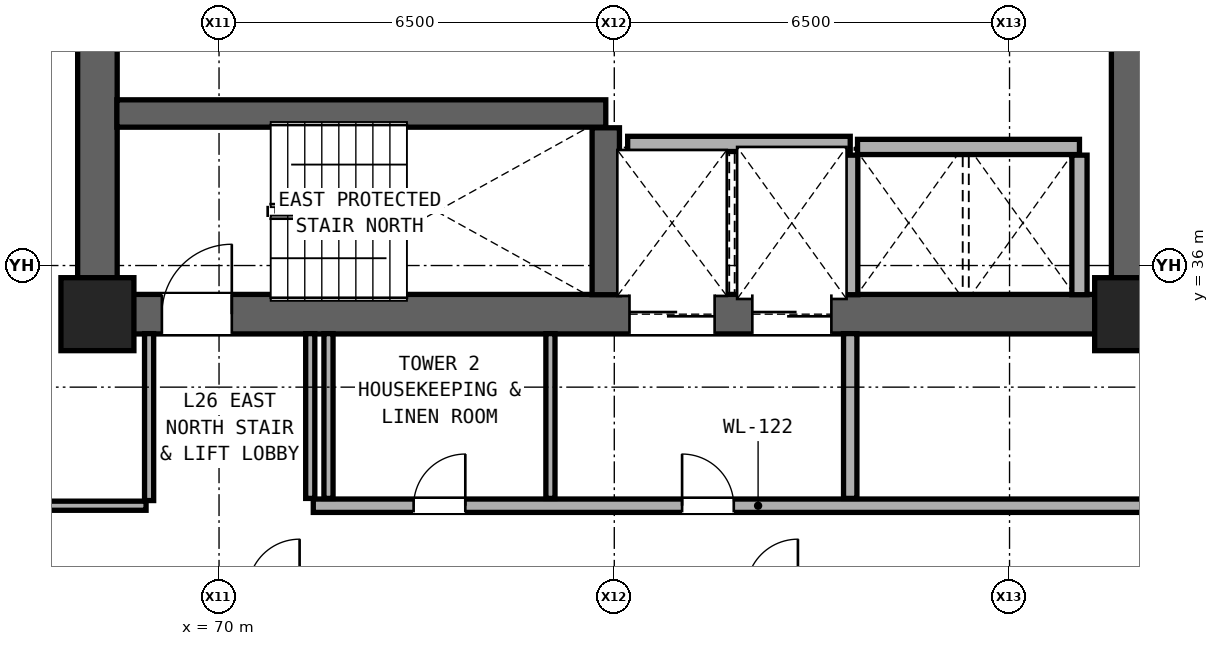
"""IFC4 building model, lengths in metres.
Left out: names, types, materials, properties, quantities, classifications, styles, units other than length and angle.
Written with IfcOpenShell. Run it as: python <this file> out.ifc"""

import sys

from ifc_helpers import new_model, si_unit, direction, frame, frame_2d, origin, origin_2d, place, context, subcontext, project, spatial, rectangle, extrude, element, fill, save


model = new_model("IFC4")
c1 = context("Model", 3, precision=1e-05, world=origin(), true_north=direction((0.0, 1.0)))
c2 = subcontext(c1, "Body", "Model", "MODEL_VIEW")
j1 = project(units=[si_unit("LENGTHUNIT", "METRE"), si_unit("PLANEANGLEUNIT", "RADIAN")], contexts=[c1])
p1 = place(None, origin())
s1 = spatial("IfcSite", under=j1, at=p1, CompositionType="ELEMENT")
p2 = place(p1, origin())
s2 = spatial("IfcBuilding", under=s1, at=p2, CompositionType="ELEMENT")
p3 = place(p2, frame((0.0, 0.0, 95.0)))
s3 = spatial("IfcBuildingStorey", under=s2, at=p3, CompositionType="ELEMENT", Elevation=95.0)
for number, where, z_axis, x_axis in (
    (1, (68.0, 35.2, 0.0), (0.0, 0.0, 1.0), (1.0, 0.0, 0.0)),
    (2, (85.0, 35.2, 0.0), (0.0, 0.0, 1.0), (1.0, 0.0, 0.0)),
):
    element("IfcColumn", number, at=place(p3, frame(where, z_axis=z_axis, x_axis=x_axis)), inside=s3, PredefinedType="COLUMN", context=c2, shape_type="SweptSolid", body=[
        extrude(rectangle(XDim=1.2, YDim=1.2, at=origin_2d()), origin(), (0.0, 0.0, 1.0), 3.3),
    ])
for number, where, z_axis, x_axis in (
    (3, (68.0, 35.2, 0.0), (0.0, 0.0, 1.0), (0.0, 1.0, 0.0)),
    (4, (85.0, 35.2, 0.0), (0.0, 0.0, 1.0), (0.0, 1.0, 0.0)),
):
    element("IfcWall", number, at=place(p3, frame(where, z_axis=z_axis, x_axis=x_axis)), inside=s3, PredefinedType="SHEAR", context=c2, shape_type="SweptSolid", body=[
        extrude(rectangle(XDim=5.6, YDim=0.65, at=frame_2d((2.8, 0.0))), origin(), (0.0, 0.0, 1.0), 3.08),
    ])
p4 = place(p3, frame((68.0, 35.2, 0.0), z_axis=(0.0, 0.0, 1.0), x_axis=(1.0, 0.0, 0.0)))
e5 = element("IfcWall", 5, at=p4, inside=s3, PredefinedType="SHEAR", context=c2, shape_type="SweptSolid", body=[
    extrude(rectangle(XDim=17.0, YDim=0.65, at=frame_2d((8.5, 0.0))), origin(), (0.0, 0.0, 1.0), 3.08),
])
p5 = place(p4, frame((1.06, 0.0, 0.0)))
e6 = element("IfcOpeningElement", 6, at=p5, cuts=e5, PredefinedType="OPENING", context=c2, shape_type="SweptSolid", body=[
    extrude(rectangle(XDim=1.15, YDim=2.2, at=frame_2d((0.575, 1.1))), frame((0.0, 0.335, 0.0), z_axis=(0.0, -1.0, 0.0), x_axis=(1.0, 0.0, 0.0)), (0.0, 0.0, 1.0), 0.67),
])
p6 = place(p4, frame((8.75, 0.0, 0.0)))
e7 = element("IfcOpeningElement", 7, at=p6, cuts=e5, PredefinedType="OPENING", context=c2, shape_type="SweptSolid", body=[
    extrude(rectangle(XDim=1.4, YDim=2.35, at=frame_2d((0.7, 1.175))), frame((0.0, 0.335, 0.0), z_axis=(0.0, -1.0, 0.0), x_axis=(1.0, 0.0, 0.0)), (0.0, 0.0, 1.0), 0.67),
])
p7 = place(p4, frame((10.77, 0.0, 0.0)))
e8 = element("IfcOpeningElement", 8, at=p7, cuts=e5, PredefinedType="OPENING", context=c2, shape_type="SweptSolid", body=[
    extrude(rectangle(XDim=1.3, YDim=2.3, at=frame_2d((0.65, 1.15))), frame((0.0, 0.335, 0.0), z_axis=(0.0, -1.0, 0.0), x_axis=(1.0, 0.0, 0.0)), (0.0, 0.0, 1.0), 0.67),
])
p8 = place(p3, frame((66.68, 32.05, 0.0), z_axis=(0.0, 0.0, 1.0), x_axis=(1.0, 0.0, 0.0)))
e9 = element("IfcWall", 9, at=p8, inside=s3, PredefinedType="PARTITIONING", context=c2, shape_type="SweptSolid", body=[
    extrude(rectangle(XDim=2.12, YDim=0.15, at=frame_2d((1.06, 0.0))), origin(), (0.0, 0.0, 1.0), 2.145),
])
p9 = place(p3, frame((71.55, 32.05, 0.0), z_axis=(0.0, 0.0, 1.0), x_axis=(1.0, 0.0, 0.0)))
e10 = element("IfcWall", 10, at=p9, inside=s3, PredefinedType="SOLIDWALL", context=c2, shape_type="SweptSolid", body=[
    extrude(rectangle(XDim=14.63, YDim=0.22, at=frame_2d((7.315, 0.0))), origin(), (0.0, 0.0, 1.0), 2.145),
])
p10 = place(p9, frame((6.065, 0.0, 0.0)))
e11 = element("IfcOpeningElement", 11, at=p10, cuts=e10, PredefinedType="OPENING", context=c2, shape_type="SweptSolid", body=[
    extrude(rectangle(XDim=0.85, YDim=2.01, at=frame_2d((0.425, 1.005))), frame((0.0, 0.12, 0.0), z_axis=(0.0, -1.0, 0.0), x_axis=(1.0, 0.0, 0.0)), (0.0, 0.0, 1.0), 0.24),
])
p11 = place(p9, frame((1.65, 0.0, 0.0)))
e12 = element("IfcOpeningElement", 12, at=p11, cuts=e10, PredefinedType="OPENING", context=c2, shape_type="SweptSolid", body=[
    extrude(rectangle(XDim=0.85, YDim=2.01, at=frame_2d((0.425, 1.005))), frame((0.0, 0.12, 0.0), z_axis=(0.0, -1.0, 0.0), x_axis=(1.0, 0.0, 0.0)), (0.0, 0.0, 1.0), 0.24),
])
p12 = place(p3, frame((80.5, 37.95, 0.0), z_axis=(0.0, 0.0, 1.0), x_axis=(1.0, 0.0, 0.0)))
e13 = element("IfcWall", 13, at=p12, inside=s3, PredefinedType="SOLIDWALL", context=c2, shape_type="SweptSolid", body=[
    extrude(rectangle(XDim=3.65, YDim=0.25, at=frame_2d((1.825, 0.0))), origin(), (0.0, 0.0, 1.0), 3.08),
])
p13 = place(p3, frame((76.72, 38.0, 0.0), z_axis=(0.0, 0.0, 1.0), x_axis=(1.0, 0.0, 0.0)))
e14 = element("IfcWall", 14, at=p13, inside=s3, PredefinedType="SOLIDWALL", context=c2, shape_type="SweptSolid", body=[
    extrude(rectangle(XDim=3.66, YDim=0.25, at=frame_2d((1.83, 0.0))), origin(), (0.0, 0.0, 1.0), 3.08),
])
p14 = place(p3, frame((68.32, 38.5, 0.0), z_axis=(0.0, 0.0, 1.0), x_axis=(1.0, 0.0, 0.0)))
e15 = element("IfcWall", 15, at=p14, inside=s3, PredefinedType="SHEAR", context=c2, shape_type="SweptSolid", body=[
    extrude(rectangle(XDim=8.04, YDim=0.45, at=frame_2d((4.02, 0.0))), origin(), (0.0, 0.0, 1.0), 3.08),
])
p15 = place(p3, frame((68.85, 32.135, 0.0), z_axis=(0.0, 0.0, 1.0), x_axis=(0.0, 1.0, 0.0)))
e16 = element("IfcWall", 16, at=p15, inside=s3, PredefinedType="PARTITIONING", context=c2, shape_type="SweptSolid", body=[
    extrude(rectangle(XDim=2.745, YDim=0.15, at=frame_2d((1.373, 0.0))), origin(), (0.0, 0.0, 1.0), 3.08),
])
for number, where, z_axis, x_axis in (
    (17, (71.5, 32.17, 0.0), (0.0, 0.0, 1.0), (0.0, 1.0, 0.0)),
    (18, (71.8, 32.17, 0.0), (0.0, 0.0, 1.0), (0.0, 1.0, 0.0)),
    (19, (75.45, 32.17, 0.0), (0.0, 0.0, 1.0), (0.0, 1.0, 0.0)),
):
    element("IfcWall", number, at=place(p3, frame(where, z_axis=z_axis, x_axis=x_axis)), inside=s3, PredefinedType="PARTITIONING", context=c2, shape_type="SweptSolid", body=[
        extrude(rectangle(XDim=2.71, YDim=0.15, at=frame_2d((1.355, 0.0))), origin(), (0.0, 0.0, 1.0), 3.08),
    ])
p16 = place(p3, frame((76.36, 35.52, 0.0), z_axis=(0.0, 0.0, 1.0), x_axis=(0.0, 1.0, 0.0)))
e20 = element("IfcWall", 20, at=p16, inside=s3, PredefinedType="SHEAR", context=c2, shape_type="SweptSolid", body=[
    extrude(rectangle(XDim=2.745, YDim=0.45, at=frame_2d((1.373, 0.0))), origin(), (0.0, 0.0, 1.0), 3.08),
])
p17 = place(p3, frame((80.38, 32.17, 0.0), z_axis=(0.0, 0.0, 1.0), x_axis=(0.0, 1.0, 0.0)))
e21 = element("IfcWall", 21, at=p17, inside=s3, PredefinedType="SOLIDWALL", context=c2, shape_type="SweptSolid", body=[
    extrude(rectangle(XDim=2.71, YDim=0.22, at=frame_2d((1.355, 0.0))), origin(), (0.0, 0.0, 1.0), 3.08),
])
for number, where, z_axis, x_axis in (
    (22, (80.38, 35.52, 0.0), (0.0, 0.0, 1.0), (0.0, 1.0, 0.0)),
    (23, (84.15, 35.52, 0.0), (0.0, 0.0, 1.0), (0.0, 1.0, 0.0)),
):
    element("IfcWall", number, at=place(p3, frame(where, z_axis=z_axis, x_axis=x_axis)), inside=s3, PredefinedType="SOLIDWALL", context=c2, shape_type="SweptSolid", body=[
        extrude(rectangle(XDim=2.295, YDim=0.25, at=frame_2d((1.147, 0.0))), origin(), (0.0, 0.0, 1.0), 3.08),
    ])
p18 = place(p5, origin())
e24 = element("IfcDoor", 24, at=p18, inside=s3, OperationType="SINGLE_SWING_RIGHT", PredefinedType="DOOR", context=c2, shape_type="SweptSolid", body=[
    extrude(rectangle(XDim=1.15, YDim=2.2, at=frame_2d((0.575, 1.1))), frame((0.0, 0.025, 0.0), z_axis=(0.0, -1.0, 0.0), x_axis=(1.0, 0.0, 0.0)), (0.0, 0.0, 1.0), 0.05),
])
fill(e6, e24)
p19 = place(p10, origin())
e25 = element("IfcDoor", 25, at=p19, inside=s3, OperationType="SINGLE_SWING_LEFT", PredefinedType="DOOR", context=c2, shape_type="SweptSolid", body=[
    extrude(rectangle(XDim=0.85, YDim=2.01, at=frame_2d((0.425, 1.005))), frame((0.0, 0.025, 0.0), z_axis=(0.0, -1.0, 0.0), x_axis=(1.0, 0.0, 0.0)), (0.0, 0.0, 1.0), 0.05),
])
fill(e11, e25)
p20 = place(p11, origin())
e26 = element("IfcDoor", 26, at=p20, inside=s3, OperationType="SINGLE_SWING_RIGHT", PredefinedType="DOOR", context=c2, shape_type="SweptSolid", body=[
    extrude(rectangle(XDim=0.85, YDim=2.01, at=frame_2d((0.425, 1.005))), frame((0.0, 0.025, 0.0), z_axis=(0.0, -1.0, 0.0), x_axis=(1.0, 0.0, 0.0)), (0.0, 0.0, 1.0), 0.05),
])
fill(e12, e26)
p21 = place(p6, origin())
e27 = element("IfcDoor", 27, at=p21, inside=s3, OperationType="DOUBLE_DOOR_SLIDING", PredefinedType="DOOR", context=c2, shape_type="SweptSolid", body=[
    extrude(rectangle(XDim=1.4, YDim=2.35, at=frame_2d((0.7, 1.175))), frame((0.0, 0.025, 0.0), z_axis=(0.0, -1.0, 0.0), x_axis=(1.0, 0.0, 0.0)), (0.0, 0.0, 1.0), 0.05),
])
fill(e7, e27)
p22 = place(p7, origin())
e28 = element("IfcDoor", 28, at=p22, inside=s3, OperationType="DOUBLE_DOOR_SLIDING", PredefinedType="DOOR", context=c2, shape_type="SweptSolid", body=[
    extrude(rectangle(XDim=1.3, YDim=2.3, at=frame_2d((0.65, 1.15))), frame((0.0, 0.025, 0.0), z_axis=(0.0, -1.0, 0.0), x_axis=(1.0, 0.0, 0.0)), (0.0, 0.0, 1.0), 0.05),
])
fill(e8, e28)
save(model, sys.argv[1])
